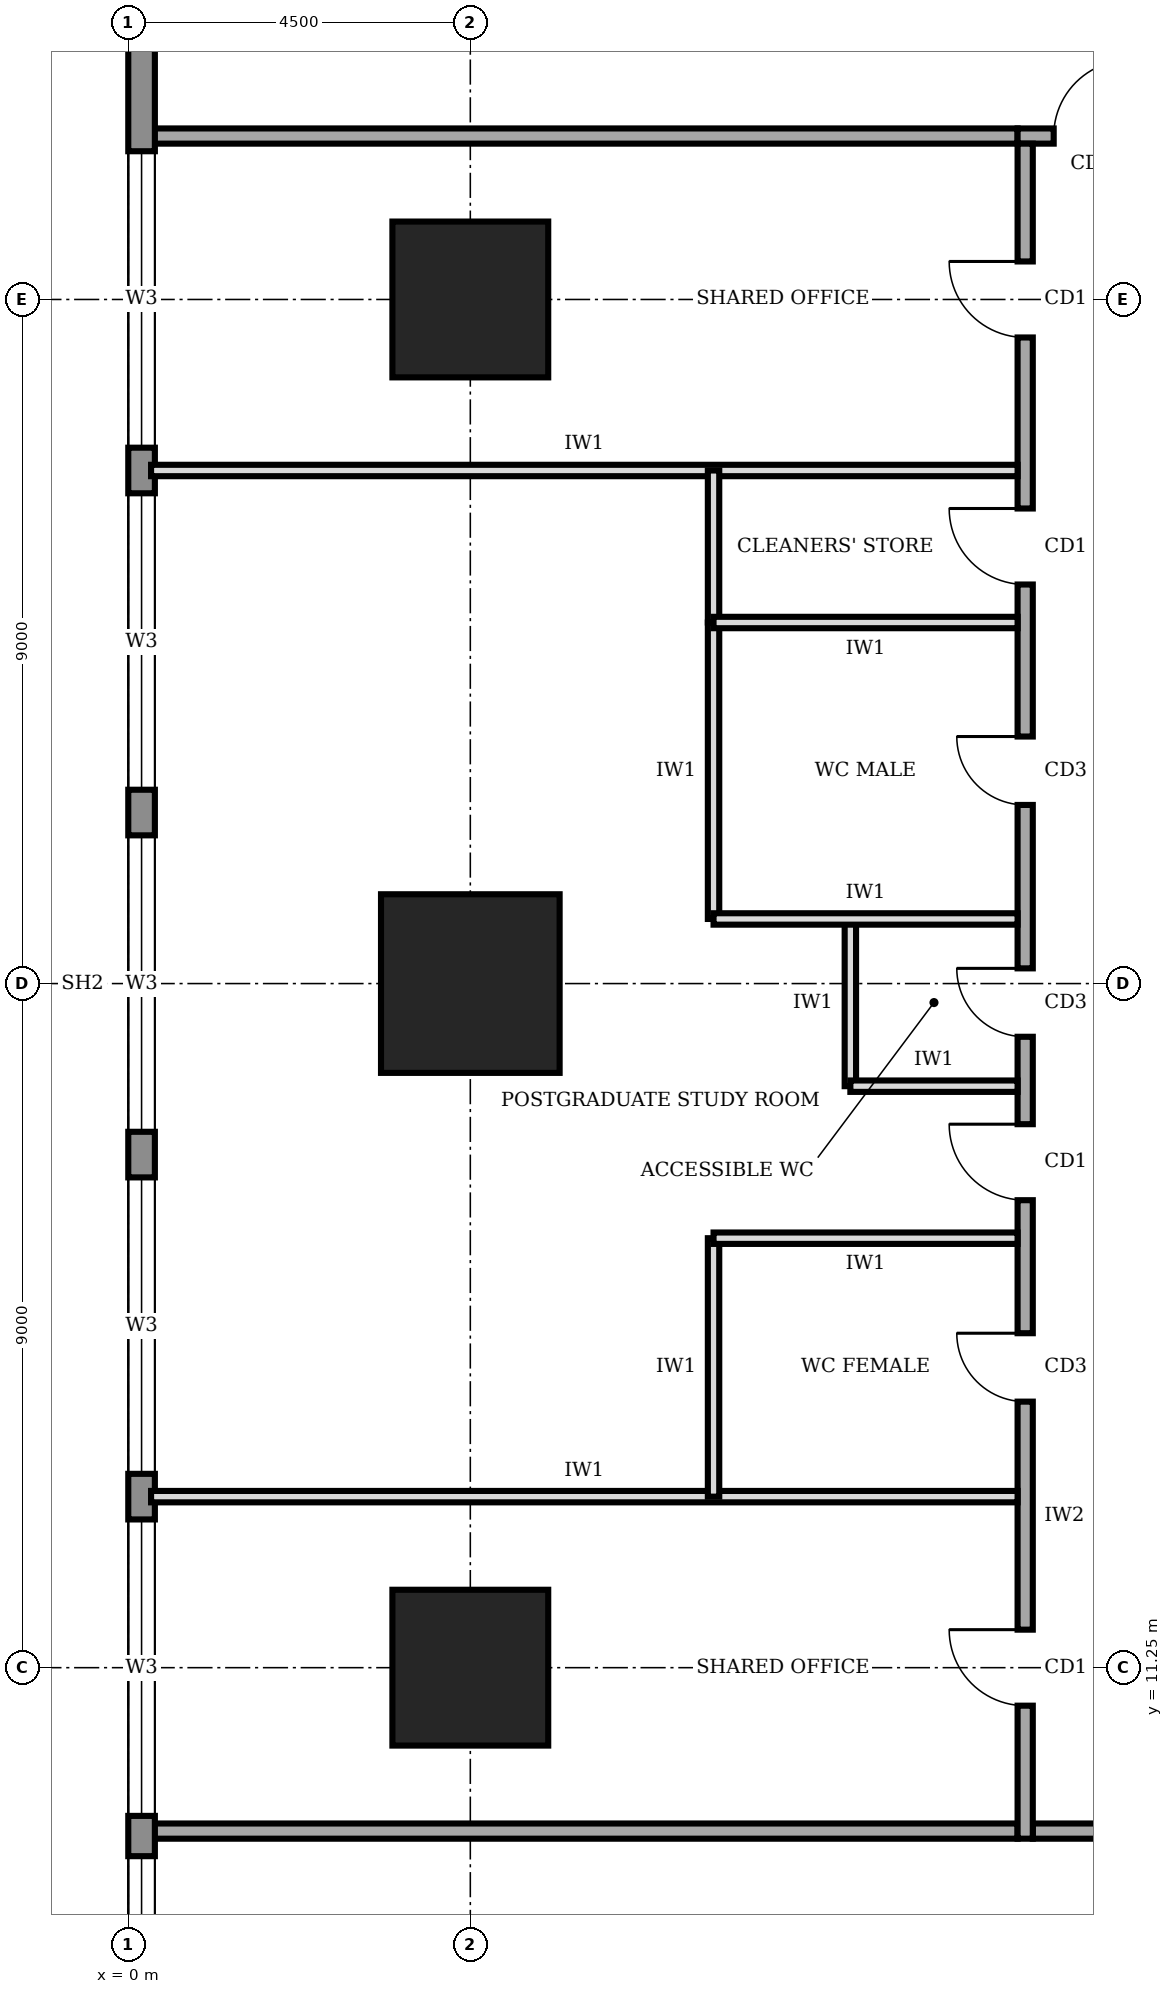
"""IFC4 building model, lengths in metres.
Left out: names, types, materials, properties, quantities, classifications, styles, units other than length and angle.
Written with IfcOpenShell. Run it as: python <this file> out.ifc"""

import sys

from ifc_helpers import new_model, si_unit, direction, frame, frame_2d, origin, origin_2d, place, context, subcontext, project, spatial, rectangle, extrude, element, fill, save


model = new_model("IFC4")
c1 = context("Model", 3, precision=1e-05, world=origin(), true_north=direction((0.0, 1.0)))
c2 = subcontext(c1, "Body", "Model", "MODEL_VIEW")
j1 = project(units=[si_unit("LENGTHUNIT", "METRE"), si_unit("PLANEANGLEUNIT", "RADIAN")], contexts=[c1])
p1 = place(None, origin())
s1 = spatial("IfcSite", under=j1, at=p1, CompositionType="ELEMENT")
p2 = place(p1, origin())
s2 = spatial("IfcBuilding", under=s1, at=p2, CompositionType="ELEMENT")
p3 = place(p2, frame((0.0, 0.0, 185.0)))
s3 = spatial("IfcBuildingStorey", under=s2, at=p3, CompositionType="ELEMENT", Elevation=185.0)
p4 = place(p3, frame((4.5, 11.25, 0.0), z_axis=(0.0, 0.0, 1.0), x_axis=(1.0, 0.0, 0.0)))
e1 = element("IfcColumn", 1, at=p4, inside=s3, PredefinedType="COLUMN", context=c2, shape_type="SweptSolid", body=[
    extrude(rectangle(XDim=2.05, YDim=2.05, at=origin_2d()), origin(), (0.0, 0.0, 1.0), 4.0),
])
p5 = place(p3, frame((4.5, 20.25, 0.0), z_axis=(0.0, 0.0, 1.0), x_axis=(1.0, 0.0, 0.0)))
e2 = element("IfcColumn", 2, at=p5, inside=s3, PredefinedType="COLUMN", context=c2, shape_type="SweptSolid", body=[
    extrude(rectangle(XDim=2.35, YDim=2.35, at=origin_2d()), origin(), (0.0, 0.0, 1.0), 4.0),
])
p6 = place(p3, frame((4.5, 29.25, 0.0), z_axis=(0.0, 0.0, 1.0), x_axis=(1.0, 0.0, 0.0)))
e3 = element("IfcColumn", 3, at=p6, inside=s3, PredefinedType="COLUMN", context=c2, shape_type="SweptSolid", body=[
    extrude(rectangle(XDim=2.05, YDim=2.05, at=origin_2d()), origin(), (0.0, 0.0, 1.0), 4.0),
])
p7 = place(p3, frame((0.175, 35.98, 0.0), z_axis=(0.0, 0.0, 1.0), x_axis=(0.0, -1.0, 0.0)))
e4 = element("IfcWall", 4, at=p7, inside=s3, PredefinedType="STANDARD", context=c2, shape_type="SweptSolid", body=[
    extrude(rectangle(XDim=31.46, YDim=0.35, at=frame_2d((15.73, 0.0))), origin(), (0.0, 0.0, 1.0), 3.75),
])
p8 = place(p7, frame((27.21, 0.0, 0.95)))
e5 = element("IfcOpeningElement", 5, at=p8, cuts=e4, PredefinedType="OPENING", context=c2, shape_type="SweptSolid", body=[
    extrude(rectangle(XDim=3.9, YDim=1.8, at=frame_2d((1.95, 0.9))), frame((0.0, 0.185, 0.0), z_axis=(0.0, -1.0, 0.0), x_axis=(1.0, 0.0, 0.0)), (0.0, 0.0, 1.0), 0.37),
])
p9 = place(p7, frame((22.78, 0.0, 0.95)))
e6 = element("IfcOpeningElement", 6, at=p9, cuts=e4, PredefinedType="OPENING", context=c2, shape_type="SweptSolid", body=[
    extrude(rectangle(XDim=3.9, YDim=1.8, at=frame_2d((1.95, 0.9))), frame((0.0, 0.185, 0.0), z_axis=(0.0, -1.0, 0.0), x_axis=(1.0, 0.0, 0.0)), (0.0, 0.0, 1.0), 0.37),
])
p10 = place(p7, frame((18.28, 0.0, 0.95)))
e7 = element("IfcOpeningElement", 7, at=p10, cuts=e4, PredefinedType="OPENING", context=c2, shape_type="SweptSolid", body=[
    extrude(rectangle(XDim=3.9, YDim=1.8, at=frame_2d((1.95, 0.9))), frame((0.0, 0.185, 0.0), z_axis=(0.0, -1.0, 0.0), x_axis=(1.0, 0.0, 0.0)), (0.0, 0.0, 1.0), 0.37),
])
p11 = place(p7, frame((13.78, 0.0, 0.95)))
e8 = element("IfcOpeningElement", 8, at=p11, cuts=e4, PredefinedType="OPENING", context=c2, shape_type="SweptSolid", body=[
    extrude(rectangle(XDim=3.9, YDim=1.8, at=frame_2d((1.95, 0.9))), frame((0.0, 0.185, 0.0), z_axis=(0.0, -1.0, 0.0), x_axis=(1.0, 0.0, 0.0)), (0.0, 0.0, 1.0), 0.37),
])
p12 = place(p7, frame((9.28, 0.0, 0.95)))
e9 = element("IfcOpeningElement", 9, at=p12, cuts=e4, PredefinedType="OPENING", context=c2, shape_type="SweptSolid", body=[
    extrude(rectangle(XDim=3.9, YDim=1.8, at=frame_2d((1.95, 0.9))), frame((0.0, 0.185, 0.0), z_axis=(0.0, -1.0, 0.0), x_axis=(1.0, 0.0, 0.0)), (0.0, 0.0, 1.0), 0.37),
])
p13 = place(p7, frame((4.78, 0.0, 0.95)))
e10 = element("IfcOpeningElement", 10, at=p13, cuts=e4, PredefinedType="OPENING", context=c2, shape_type="SweptSolid", body=[
    extrude(rectangle(XDim=3.9, YDim=1.8, at=frame_2d((1.95, 0.9))), frame((0.0, 0.185, 0.0), z_axis=(0.0, -1.0, 0.0), x_axis=(1.0, 0.0, 0.0)), (0.0, 0.0, 1.0), 0.37),
])
p14 = place(p3, frame((11.9, 9.1, 0.0), z_axis=(0.0, 0.0, 1.0), x_axis=(1.0, 0.0, 0.0)))
e11 = element("IfcWall", 11, at=p14, inside=s3, PredefinedType="SOLIDWALL", context=c2, shape_type="SweptSolid", body=[
    extrude(rectangle(XDim=16.9, YDim=0.2, at=frame_2d((8.45, 0.0))), origin(), (0.0, 0.0, 1.0), 3.75),
])
p15 = place(p14, frame((15.425, 0.0, 0.0)))
e12 = element("IfcOpeningElement", 12, at=p15, cuts=e11, PredefinedType="OPENING", context=c2, shape_type="SweptSolid", body=[
    extrude(rectangle(XDim=1.0, YDim=2.1, at=frame_2d((0.5, 1.05))), frame((0.0, 0.11, 0.0), z_axis=(0.0, -1.0, 0.0), x_axis=(1.0, 0.0, 0.0)), (0.0, 0.0, 1.0), 0.22),
])
p16 = place(p3, frame((28.6, 31.4, 0.0), z_axis=(0.0, 0.0, 1.0), x_axis=(-1.0, 0.0, 0.0)))
e13 = element("IfcWall", 13, at=p16, inside=s3, PredefinedType="SOLIDWALL", context=c2, shape_type="SweptSolid", body=[
    extrude(rectangle(XDim=16.9, YDim=0.2, at=frame_2d((8.45, 0.0))), origin(), (0.0, 0.0, 1.0), 3.75),
])
p17 = place(p16, frame((15.425, 0.0, 0.0)))
e14 = element("IfcOpeningElement", 14, at=p17, cuts=e13, PredefinedType="OPENING", context=c2, shape_type="SweptSolid", body=[
    extrude(rectangle(XDim=1.0, YDim=2.1, at=frame_2d((0.5, 1.05))), frame((0.0, 0.11, 0.0), z_axis=(0.0, -1.0, 0.0), x_axis=(1.0, 0.0, 0.0)), (0.0, 0.0, 1.0), 0.22),
])
p18 = place(p16, frame((12.35, 0.0, 0.0)))
e15 = element("IfcOpeningElement", 15, at=p18, cuts=e13, PredefinedType="OPENING", context=c2, shape_type="SweptSolid", body=[
    extrude(rectangle(XDim=1.0, YDim=2.1, at=frame_2d((0.5, 1.05))), frame((0.0, 0.11, 0.0), z_axis=(0.0, -1.0, 0.0), x_axis=(1.0, 0.0, 0.0)), (0.0, 0.0, 1.0), 0.22),
])
p19 = place(p16, frame((5.6, 0.0, 0.0)))
e16 = element("IfcOpeningElement", 16, at=p19, cuts=e13, PredefinedType="OPENING", context=c2, shape_type="SweptSolid", body=[
    extrude(rectangle(XDim=1.0, YDim=2.1, at=frame_2d((0.5, 1.05))), frame((0.0, 0.11, 0.0), z_axis=(0.0, -1.0, 0.0), x_axis=(1.0, 0.0, 0.0)), (0.0, 0.0, 1.0), 0.22),
])
p20 = place(p16, frame((0.275, 0.0, 0.0)))
e17 = element("IfcOpeningElement", 17, at=p20, cuts=e13, PredefinedType="OPENING", context=c2, shape_type="SweptSolid", body=[
    extrude(rectangle(XDim=1.0, YDim=2.1, at=frame_2d((0.5, 1.05))), frame((0.0, 0.11, 0.0), z_axis=(0.0, -1.0, 0.0), x_axis=(1.0, 0.0, 0.0)), (0.0, 0.0, 1.0), 0.22),
])
p21 = place(p3, frame((11.8, 31.3, 0.0), z_axis=(0.0, 0.0, 1.0), x_axis=(0.0, -1.0, 0.0)))
e18 = element("IfcWall", 18, at=p21, inside=s3, PredefinedType="SOLIDWALL", context=c2, shape_type="SweptSolid", body=[
    extrude(rectangle(XDim=22.3, YDim=0.2, at=frame_2d((11.15, 0.0))), origin(), (0.0, 0.0, 1.0), 3.75),
])
p22 = place(p21, frame((19.55, 0.0, 0.0)))
e19 = element("IfcOpeningElement", 19, at=p22, cuts=e18, PredefinedType="OPENING", context=c2, shape_type="SweptSolid", body=[
    extrude(rectangle(XDim=1.0, YDim=2.1, at=frame_2d((0.5, 1.05))), frame((0.0, 0.11, 0.0), z_axis=(0.0, -1.0, 0.0), x_axis=(1.0, 0.0, 0.0)), (0.0, 0.0, 1.0), 0.22),
])
p23 = place(p21, frame((15.65, 0.0, 0.0)))
e20 = element("IfcOpeningElement", 20, at=p23, cuts=e18, PredefinedType="OPENING", context=c2, shape_type="SweptSolid", body=[
    extrude(rectangle(XDim=0.9, YDim=2.1, at=frame_2d((0.45, 1.05))), frame((0.0, 0.11, 0.0), z_axis=(0.0, -1.0, 0.0), x_axis=(1.0, 0.0, 0.0)), (0.0, 0.0, 1.0), 0.22),
])
p24 = place(p21, frame((10.85, 0.0, 0.0)))
e21 = element("IfcOpeningElement", 21, at=p24, cuts=e18, PredefinedType="OPENING", context=c2, shape_type="SweptSolid", body=[
    extrude(rectangle(XDim=0.9, YDim=2.1, at=frame_2d((0.45, 1.05))), frame((0.0, 0.11, 0.0), z_axis=(0.0, -1.0, 0.0), x_axis=(1.0, 0.0, 0.0)), (0.0, 0.0, 1.0), 0.22),
])
p25 = place(p21, frame((7.8, 0.0, 0.0)))
e22 = element("IfcOpeningElement", 22, at=p25, cuts=e18, PredefinedType="OPENING", context=c2, shape_type="SweptSolid", body=[
    extrude(rectangle(XDim=0.9, YDim=2.1, at=frame_2d((0.45, 1.05))), frame((0.0, 0.11, 0.0), z_axis=(0.0, -1.0, 0.0), x_axis=(1.0, 0.0, 0.0)), (0.0, 0.0, 1.0), 0.22),
])
p26 = place(p21, frame((4.8, 0.0, 0.0)))
e23 = element("IfcOpeningElement", 23, at=p26, cuts=e18, PredefinedType="OPENING", context=c2, shape_type="SweptSolid", body=[
    extrude(rectangle(XDim=1.0, YDim=2.1, at=frame_2d((0.5, 1.05))), frame((0.0, 0.11, 0.0), z_axis=(0.0, -1.0, 0.0), x_axis=(1.0, 0.0, 0.0)), (0.0, 0.0, 1.0), 0.22),
])
p27 = place(p21, frame((12.9, 0.0, 0.0)))
e24 = element("IfcOpeningElement", 24, at=p27, cuts=e18, PredefinedType="OPENING", context=c2, shape_type="SweptSolid", body=[
    extrude(rectangle(XDim=1.0, YDim=2.1, at=frame_2d((0.5, 1.05))), frame((0.0, 0.11, 0.0), z_axis=(0.0, -1.0, 0.0), x_axis=(1.0, 0.0, 0.0)), (0.0, 0.0, 1.0), 0.22),
])
p28 = place(p21, frame((1.55, 0.0, 0.0)))
e25 = element("IfcOpeningElement", 25, at=p28, cuts=e18, PredefinedType="OPENING", context=c2, shape_type="SweptSolid", body=[
    extrude(rectangle(XDim=1.0, YDim=2.1, at=frame_2d((0.5, 1.05))), frame((0.0, 0.11, 0.0), z_axis=(0.0, -1.0, 0.0), x_axis=(1.0, 0.0, 0.0)), (0.0, 0.0, 1.0), 0.22),
])
for number, where, z_axis, x_axis in (
    (26, (0.3, 9.1, 0.0), (0.0, 0.0, 1.0), (1.0, 0.0, 0.0)),
    (27, (0.3, 31.4, 0.0), (0.0, 0.0, 1.0), (1.0, 0.0, 0.0)),
):
    element("IfcWall", number, at=place(p3, frame(where, z_axis=z_axis, x_axis=x_axis)), inside=s3, PredefinedType="SOLIDWALL", context=c2, shape_type="SweptSolid", body=[
        extrude(rectangle(XDim=11.4, YDim=0.2, at=frame_2d((5.7, 0.0))), origin(), (0.0, 0.0, 1.0), 3.75),
    ])
for number, where, z_axis, x_axis in (
    (28, (0.3, 13.5, 0.0), (0.0, 0.0, 1.0), (1.0, 0.0, 0.0)),
    (29, (0.3, 27.0, 0.0), (0.0, 0.0, 1.0), (1.0, 0.0, 0.0)),
):
    element("IfcWall", number, at=place(p3, frame(where, z_axis=z_axis, x_axis=x_axis)), inside=s3, PredefinedType="PARTITIONING", context=c2, shape_type="SweptSolid", body=[
        extrude(rectangle(XDim=11.4, YDim=0.15, at=frame_2d((5.7, 0.0))), origin(), (0.0, 0.0, 1.0), 3.75),
    ])
p29 = place(p3, frame((11.7, 16.9, 0.0), z_axis=(0.0, 0.0, 1.0), x_axis=(-1.0, 0.0, 0.0)))
e30 = element("IfcWall", 30, at=p29, inside=s3, PredefinedType="PARTITIONING", context=c2, shape_type="SweptSolid", body=[
    extrude(rectangle(XDim=4.0, YDim=0.15, at=frame_2d((2.0, 0.0))), origin(), (0.0, 0.0, 1.0), 3.75),
])
p30 = place(p3, frame((11.7, 18.9, 0.0), z_axis=(0.0, 0.0, 1.0), x_axis=(-1.0, 0.0, 0.0)))
e31 = element("IfcWall", 31, at=p30, inside=s3, PredefinedType="PARTITIONING", context=c2, shape_type="SweptSolid", body=[
    extrude(rectangle(XDim=2.2, YDim=0.15, at=frame_2d((1.1, 0.0))), origin(), (0.0, 0.0, 1.0), 3.75),
])
p31 = place(p3, frame((11.7, 21.1, 0.0), z_axis=(0.0, 0.0, 1.0), x_axis=(-1.0, 0.0, 0.0)))
e32 = element("IfcWall", 32, at=p31, inside=s3, PredefinedType="PARTITIONING", context=c2, shape_type="SweptSolid", body=[
    extrude(rectangle(XDim=4.0, YDim=0.15, at=frame_2d((2.0, 0.0))), origin(), (0.0, 0.0, 1.0), 2.85),
])
p32 = place(p3, frame((11.7, 25.0, 0.0), z_axis=(0.0, 0.0, 1.0), x_axis=(-1.0, 0.0, 0.0)))
e33 = element("IfcWall", 33, at=p32, inside=s3, PredefinedType="PARTITIONING", context=c2, shape_type="SweptSolid", body=[
    extrude(rectangle(XDim=4.0, YDim=0.15, at=frame_2d((2.0, 0.0))), origin(), (0.0, 0.0, 1.0), 3.75),
])
p33 = place(p3, frame((7.7, 13.5, 0.0), z_axis=(0.0, 0.0, 1.0), x_axis=(0.0, 1.0, 0.0)))
e34 = element("IfcWall", 34, at=p33, inside=s3, PredefinedType="PARTITIONING", context=c2, shape_type="SweptSolid", body=[
    extrude(rectangle(XDim=3.4, YDim=0.15, at=frame_2d((1.7, 0.0))), origin(), (0.0, 0.0, 1.0), 3.75),
])
p34 = place(p3, frame((9.5, 18.9, 0.0), z_axis=(0.0, 0.0, 1.0), x_axis=(0.0, 1.0, 0.0)))
e35 = element("IfcWall", 35, at=p34, inside=s3, PredefinedType="PARTITIONING", context=c2, shape_type="SweptSolid", body=[
    extrude(rectangle(XDim=2.2, YDim=0.15, at=frame_2d((1.1, 0.0))), origin(), (0.0, 0.0, 1.0), 3.75),
])
p35 = place(p3, frame((7.7, 21.1, 0.0), z_axis=(0.0, 0.0, 1.0), x_axis=(0.0, 1.0, 0.0)))
e36 = element("IfcWall", 36, at=p35, inside=s3, PredefinedType="PARTITIONING", context=c2, shape_type="SweptSolid", body=[
    extrude(rectangle(XDim=3.9, YDim=0.15, at=frame_2d((1.95, 0.0))), origin(), (0.0, 0.0, 1.0), 3.75),
])
p36 = place(p3, frame((7.7, 25.0, 0.0), z_axis=(0.0, 0.0, 1.0), x_axis=(0.0, 1.0, 0.0)))
e37 = element("IfcWall", 37, at=p36, inside=s3, PredefinedType="PARTITIONING", context=c2, shape_type="SweptSolid", body=[
    extrude(rectangle(XDim=2.0, YDim=0.15, at=frame_2d((1.0, 0.0))), origin(), (0.0, 0.0, 1.0), 3.75),
])
p37 = place(p8, origin())
e38 = element("IfcWindow", 38, at=p37, inside=s3, PartitioningType="SINGLE_PANEL", PredefinedType="WINDOW", context=c2, shape_type="SweptSolid", body=[
    extrude(rectangle(XDim=3.9, YDim=1.8, at=frame_2d((1.95, 0.9))), frame((0.0, 0.03, 0.0), z_axis=(0.0, -1.0, 0.0), x_axis=(1.0, 0.0, 0.0)), (0.0, 0.0, 1.0), 0.06),
])
fill(e5, e38)
p38 = place(p9, origin())
e39 = element("IfcWindow", 39, at=p38, inside=s3, PartitioningType="SINGLE_PANEL", PredefinedType="WINDOW", context=c2, shape_type="SweptSolid", body=[
    extrude(rectangle(XDim=3.9, YDim=1.8, at=frame_2d((1.95, 0.9))), frame((0.0, 0.03, 0.0), z_axis=(0.0, -1.0, 0.0), x_axis=(1.0, 0.0, 0.0)), (0.0, 0.0, 1.0), 0.06),
])
fill(e6, e39)
p39 = place(p10, origin())
e40 = element("IfcWindow", 40, at=p39, inside=s3, PartitioningType="SINGLE_PANEL", PredefinedType="WINDOW", context=c2, shape_type="SweptSolid", body=[
    extrude(rectangle(XDim=3.9, YDim=1.8, at=frame_2d((1.95, 0.9))), frame((0.0, 0.03, 0.0), z_axis=(0.0, -1.0, 0.0), x_axis=(1.0, 0.0, 0.0)), (0.0, 0.0, 1.0), 0.06),
])
fill(e7, e40)
p40 = place(p11, origin())
e41 = element("IfcWindow", 41, at=p40, inside=s3, PartitioningType="SINGLE_PANEL", PredefinedType="WINDOW", context=c2, shape_type="SweptSolid", body=[
    extrude(rectangle(XDim=3.9, YDim=1.8, at=frame_2d((1.95, 0.9))), frame((0.0, 0.03, 0.0), z_axis=(0.0, -1.0, 0.0), x_axis=(1.0, 0.0, 0.0)), (0.0, 0.0, 1.0), 0.06),
])
fill(e8, e41)
p41 = place(p12, origin())
e42 = element("IfcWindow", 42, at=p41, inside=s3, PartitioningType="SINGLE_PANEL", PredefinedType="WINDOW", context=c2, shape_type="SweptSolid", body=[
    extrude(rectangle(XDim=3.9, YDim=1.8, at=frame_2d((1.95, 0.9))), frame((0.0, 0.03, 0.0), z_axis=(0.0, -1.0, 0.0), x_axis=(1.0, 0.0, 0.0)), (0.0, 0.0, 1.0), 0.06),
])
fill(e9, e42)
p42 = place(p13, origin())
e43 = element("IfcWindow", 43, at=p42, inside=s3, PartitioningType="SINGLE_PANEL", PredefinedType="WINDOW", context=c2, shape_type="SweptSolid", body=[
    extrude(rectangle(XDim=3.9, YDim=1.8, at=frame_2d((1.95, 0.9))), frame((0.0, 0.03, 0.0), z_axis=(0.0, -1.0, 0.0), x_axis=(1.0, 0.0, 0.0)), (0.0, 0.0, 1.0), 0.06),
])
fill(e10, e43)
p43 = place(p17, frame((1.0, 0.0, 0.0), z_axis=(0.0, 0.0, 1.0), x_axis=(-1.0, 0.0, 0.0)))
e44 = element("IfcDoor", 44, at=p43, inside=s3, OperationType="SINGLE_SWING_RIGHT", PredefinedType="DOOR", context=c2, shape_type="SweptSolid", body=[
    extrude(rectangle(XDim=1.0, YDim=2.1, at=frame_2d((0.5, 1.05))), frame((0.0, 0.025, 0.0), z_axis=(0.0, -1.0, 0.0), x_axis=(1.0, 0.0, 0.0)), (0.0, 0.0, 1.0), 0.05),
])
fill(e14, e44)
p44 = place(p22, frame((1.0, 0.0, 0.0), z_axis=(0.0, 0.0, 1.0), x_axis=(-1.0, 0.0, 0.0)))
e45 = element("IfcDoor", 45, at=p44, inside=s3, OperationType="SINGLE_SWING_RIGHT", PredefinedType="DOOR", context=c2, shape_type="SweptSolid", body=[
    extrude(rectangle(XDim=1.0, YDim=2.1, at=frame_2d((0.5, 1.05))), frame((0.0, 0.025, 0.0), z_axis=(0.0, -1.0, 0.0), x_axis=(1.0, 0.0, 0.0)), (0.0, 0.0, 1.0), 0.05),
])
fill(e19, e45)
p45 = place(p23, frame((0.9, 0.0, 0.0), z_axis=(0.0, 0.0, 1.0), x_axis=(-1.0, 0.0, 0.0)))
e46 = element("IfcDoor", 46, at=p45, inside=s3, OperationType="SINGLE_SWING_RIGHT", PredefinedType="DOOR", context=c2, shape_type="SweptSolid", body=[
    extrude(rectangle(XDim=0.9, YDim=2.1, at=frame_2d((0.45, 1.05))), frame((0.0, 0.025, 0.0), z_axis=(0.0, -1.0, 0.0), x_axis=(1.0, 0.0, 0.0)), (0.0, 0.0, 1.0), 0.05),
])
fill(e20, e46)
p46 = place(p24, frame((0.9, 0.0, 0.0), z_axis=(0.0, 0.0, 1.0), x_axis=(-1.0, 0.0, 0.0)))
e47 = element("IfcDoor", 47, at=p46, inside=s3, OperationType="SINGLE_SWING_RIGHT", PredefinedType="DOOR", context=c2, shape_type="SweptSolid", body=[
    extrude(rectangle(XDim=0.9, YDim=2.1, at=frame_2d((0.45, 1.05))), frame((0.0, 0.025, 0.0), z_axis=(0.0, -1.0, 0.0), x_axis=(1.0, 0.0, 0.0)), (0.0, 0.0, 1.0), 0.05),
])
fill(e21, e47)
p47 = place(p25, frame((0.9, 0.0, 0.0), z_axis=(0.0, 0.0, 1.0), x_axis=(-1.0, 0.0, 0.0)))
e48 = element("IfcDoor", 48, at=p47, inside=s3, OperationType="SINGLE_SWING_RIGHT", PredefinedType="DOOR", context=c2, shape_type="SweptSolid", body=[
    extrude(rectangle(XDim=0.9, YDim=2.1, at=frame_2d((0.45, 1.05))), frame((0.0, 0.025, 0.0), z_axis=(0.0, -1.0, 0.0), x_axis=(1.0, 0.0, 0.0)), (0.0, 0.0, 1.0), 0.05),
])
fill(e22, e48)
p48 = place(p26, frame((1.0, 0.0, 0.0), z_axis=(0.0, 0.0, 1.0), x_axis=(-1.0, 0.0, 0.0)))
e49 = element("IfcDoor", 49, at=p48, inside=s3, OperationType="SINGLE_SWING_RIGHT", PredefinedType="DOOR", context=c2, shape_type="SweptSolid", body=[
    extrude(rectangle(XDim=1.0, YDim=2.1, at=frame_2d((0.5, 1.05))), frame((0.0, 0.025, 0.0), z_axis=(0.0, -1.0, 0.0), x_axis=(1.0, 0.0, 0.0)), (0.0, 0.0, 1.0), 0.05),
])
fill(e23, e49)
p49 = place(p27, frame((1.0, 0.0, 0.0), z_axis=(0.0, 0.0, 1.0), x_axis=(-1.0, 0.0, 0.0)))
e50 = element("IfcDoor", 50, at=p49, inside=s3, OperationType="SINGLE_SWING_RIGHT", PredefinedType="DOOR", context=c2, shape_type="SweptSolid", body=[
    extrude(rectangle(XDim=1.0, YDim=2.1, at=frame_2d((0.5, 1.05))), frame((0.0, 0.025, 0.0), z_axis=(0.0, -1.0, 0.0), x_axis=(1.0, 0.0, 0.0)), (0.0, 0.0, 1.0), 0.05),
])
fill(e24, e50)
p50 = place(p28, frame((1.0, 0.0, 0.0), z_axis=(0.0, 0.0, 1.0), x_axis=(-1.0, 0.0, 0.0)))
e51 = element("IfcDoor", 51, at=p50, inside=s3, OperationType="SINGLE_SWING_RIGHT", PredefinedType="DOOR", context=c2, shape_type="SweptSolid", body=[
    extrude(rectangle(XDim=1.0, YDim=2.1, at=frame_2d((0.5, 1.05))), frame((0.0, 0.025, 0.0), z_axis=(0.0, -1.0, 0.0), x_axis=(1.0, 0.0, 0.0)), (0.0, 0.0, 1.0), 0.05),
])
fill(e25, e51)
save(model, sys.argv[1])
